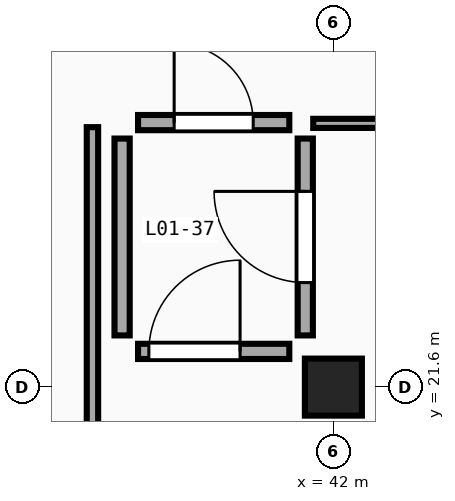
"""IFC4 building model, lengths in metres.
Left out: names, types, materials, properties, quantities, classifications, styles, units other than length and angle.
Written with IfcOpenShell. Run it as: python <this file> out.ifc"""

import sys

from ifc_helpers import new_model, si_unit, direction, frame, frame_2d, origin, origin_2d, place, context, subcontext, project, spatial, rectangle, extrude, element, fill, save


model = new_model("IFC4")
c1 = context("Model", 3, precision=1e-05, world=origin(), true_north=direction((0.0, 1.0)))
c2 = subcontext(c1, "Body", "Model", "MODEL_VIEW")
j1 = project(units=[si_unit("LENGTHUNIT", "METRE"), si_unit("PLANEANGLEUNIT", "RADIAN")], contexts=[c1])
p1 = place(None, origin())
s1 = spatial("IfcSite", under=j1, at=p1, CompositionType="ELEMENT")
p2 = place(p1, origin())
s2 = spatial("IfcBuilding", under=s1, at=p2, CompositionType="ELEMENT")
p3 = place(p2, frame((0.0, 0.0, 5.4)))
s3 = spatial("IfcBuildingStorey", under=s2, at=p3, CompositionType="ELEMENT", Elevation=5.4)
p4 = place(p3, frame((42.0, 21.6, 0.0), z_axis=(0.0, 0.0, 1.0), x_axis=(1.0, 0.0, 0.0)))
e1 = element("IfcColumn", 1, at=p4, inside=s3, PredefinedType="COLUMN", context=c2, shape_type="SweptSolid", body=[
    extrude(rectangle(XDim=0.75, YDim=0.75, at=origin_2d()), origin(), (0.0, 0.0, 1.0), 4.5),
])
p5 = place(p3, frame((41.735, 25.07, 0.0), z_axis=(0.0, 0.0, 1.0), x_axis=(1.0, 0.0, 0.0)))
e2 = element("IfcWall", 2, at=p5, inside=s3, PredefinedType="PARTITIONING", context=c2, shape_type="SweptSolid", body=[
    extrude(rectangle(XDim=8.255, YDim=0.12, at=frame_2d((4.127, 0.0))), origin(), (0.0, 0.0, 1.0), 4.18),
])
p6 = place(p5, frame((3.448, 0.0, 0.0)))
e3 = element("IfcOpeningElement", 3, at=p6, cuts=e2, PredefinedType="OPENING", context=c2, shape_type="SweptSolid", body=[
    extrude(rectangle(XDim=1.36, YDim=2.05, at=frame_2d((0.68, 1.025))), frame((0.0, 0.08, 0.0), z_axis=(0.0, -1.0, 0.0), x_axis=(1.0, 0.0, 0.0)), (0.0, 0.0, 1.0), 0.16),
])
p7 = place(p3, frame((38.83, 21.03, 0.0), z_axis=(0.0, 0.0, 1.0), x_axis=(0.0, 1.0, 0.0)))
e4 = element("IfcWall", 4, at=p7, inside=s3, PredefinedType="PARTITIONING", context=c2, shape_type="SweptSolid", body=[
    extrude(rectangle(XDim=3.99, YDim=0.15, at=frame_2d((1.995, 0.0))), origin(), (0.0, 0.0, 1.0), 4.18),
])
p8 = place(p3, frame((41.63, 22.28, 0.0), z_axis=(0.0, 0.0, 1.0), x_axis=(0.0, 1.0, 0.0)))
e5 = element("IfcWall", 5, at=p8, inside=s3, PredefinedType="PLUMBINGWALL", context=c2, shape_type="SweptSolid", body=[
    extrude(rectangle(XDim=2.59, YDim=0.2, at=frame_2d((1.295, 0.0))), origin(), (0.0, 0.0, 1.0), 3.73),
])
p9 = place(p8, frame((0.695, 0.0, 0.0)))
e6 = element("IfcOpeningElement", 6, at=p9, cuts=e5, PredefinedType="OPENING", context=c2, shape_type="SweptSolid", body=[
    extrude(rectangle(XDim=1.2, YDim=2.45, at=frame_2d((0.6, 1.225))), frame((0.0, 0.12, 0.0), z_axis=(0.0, -1.0, 0.0), x_axis=(1.0, 0.0, 0.0)), (0.0, 0.0, 1.0), 0.24),
])
p10 = place(p3, frame((39.22, 22.28, 0.0), z_axis=(0.0, 0.0, 1.0), x_axis=(0.0, 1.0, 0.0)))
e7 = element("IfcWall", 7, at=p10, inside=s3, PredefinedType="PLUMBINGWALL", context=c2, shape_type="SweptSolid", body=[
    extrude(rectangle(XDim=2.59, YDim=0.2, at=frame_2d((1.295, 0.0))), origin(), (0.0, 0.0, 1.0), 4.18),
])
p11 = place(p3, frame((39.43, 25.08, 0.0), z_axis=(0.0, 0.0, 1.0), x_axis=(1.0, 0.0, 0.0)))
e8 = element("IfcWall", 8, at=p11, inside=s3, PredefinedType="PLUMBINGWALL", context=c2, shape_type="SweptSolid", body=[
    extrude(rectangle(XDim=1.99, YDim=0.2, at=frame_2d((0.995, 0.0))), origin(), (0.0, 0.0, 1.0), 4.18),
])
p12 = place(p11, frame((0.475, 0.0, 0.0)))
e9 = element("IfcOpeningElement", 9, at=p12, cuts=e8, PredefinedType="OPENING", context=c2, shape_type="SweptSolid", body=[
    extrude(rectangle(XDim=1.04, YDim=2.29, at=frame_2d((0.52, 1.145))), frame((0.0, 0.12, 0.0), z_axis=(0.0, -1.0, 0.0), x_axis=(1.0, 0.0, 0.0)), (0.0, 0.0, 1.0), 0.24),
])
p13 = place(p3, frame((39.43, 22.07, 0.0), z_axis=(0.0, 0.0, 1.0), x_axis=(1.0, 0.0, 0.0)))
e10 = element("IfcWall", 10, at=p13, inside=s3, PredefinedType="PLUMBINGWALL", context=c2, shape_type="SweptSolid", body=[
    extrude(rectangle(XDim=1.99, YDim=0.2, at=frame_2d((0.995, 0.0))), origin(), (0.0, 0.0, 1.0), 3.73),
])
p14 = place(p13, frame((0.142, 0.0, 0.0)))
e11 = element("IfcOpeningElement", 11, at=p14, cuts=e10, PredefinedType="OPENING", context=c2, shape_type="SweptSolid", body=[
    extrude(rectangle(XDim=1.2, YDim=2.29, at=frame_2d((0.6, 1.145))), frame((0.0, 0.12, 0.0), z_axis=(0.0, -1.0, 0.0), x_axis=(1.0, 0.0, 0.0)), (0.0, 0.0, 1.0), 0.24),
])
p15 = place(p9, origin())
e12 = element("IfcDoor", 12, at=p15, inside=s3, OperationType="SINGLE_SWING_RIGHT", PredefinedType="DOOR", context=c2, shape_type="SweptSolid", body=[
    extrude(rectangle(XDim=1.2, YDim=2.45, at=frame_2d((0.6, 1.225))), frame((0.0, 0.025, 0.0), z_axis=(0.0, -1.0, 0.0), x_axis=(1.0, 0.0, 0.0)), (0.0, 0.0, 1.0), 0.05),
])
fill(e6, e12)
p16 = place(p12, origin())
e13 = element("IfcDoor", 13, at=p16, inside=s3, OperationType="SINGLE_SWING_LEFT", PredefinedType="DOOR", context=c2, shape_type="SweptSolid", body=[
    extrude(rectangle(XDim=1.04, YDim=2.29, at=frame_2d((0.52, 1.145))), frame((0.0, 0.025, 0.0), z_axis=(0.0, -1.0, 0.0), x_axis=(1.0, 0.0, 0.0)), (0.0, 0.0, 1.0), 0.05),
])
fill(e9, e13)
p17 = place(p14, origin())
e14 = element("IfcDoor", 14, at=p17, inside=s3, OperationType="SINGLE_SWING_RIGHT", PredefinedType="DOOR", context=c2, shape_type="SweptSolid", body=[
    extrude(rectangle(XDim=1.2, YDim=2.29, at=frame_2d((0.6, 1.145))), frame((0.0, 0.025, 0.0), z_axis=(0.0, -1.0, 0.0), x_axis=(1.0, 0.0, 0.0)), (0.0, 0.0, 1.0), 0.05),
])
fill(e11, e14)
save(model, sys.argv[1])
